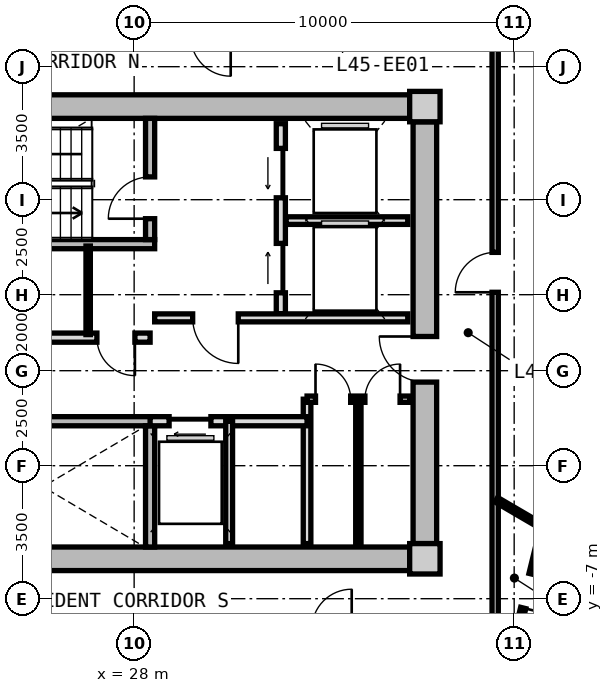
"""IFC4 building model, lengths in metres.
Left out: names, types, materials, properties, quantities, classifications, styles, units other than length and angle.
Written with IfcOpenShell. Run it as: python <this file> out.ifc"""

import sys

from ifc_helpers import new_model, si_unit, direction, frame, frame_2d, origin, origin_2d, place, context, subcontext, project, spatial, rectangle, extrude, source, transform, mapped, element, fill, save


model = new_model("IFC4")
c1 = context("Model", 3, precision=1e-05, world=origin(), true_north=direction((0.0, 1.0)))
c2 = subcontext(c1, "Body", "Model", "MODEL_VIEW")
j1 = project(units=[si_unit("LENGTHUNIT", "METRE"), si_unit("PLANEANGLEUNIT", "RADIAN")], contexts=[c1])
p1 = place(None, origin())
s1 = spatial("IfcSite", under=j1, at=p1, CompositionType="ELEMENT")
p2 = place(p1, origin())
s2 = spatial("IfcBuilding", under=s1, at=p2, CompositionType="ELEMENT")
p3 = place(p2, frame((0.0, 0.0, 146.5)))
s3 = spatial("IfcBuildingStorey", under=s2, at=p3, CompositionType="ELEMENT", Elevation=146.5)
m1 = source(origin(), c2, "Body", "SweptSolid", [
    extrude(rectangle(XDim=0.8, YDim=0.8, at=origin_2d()), origin(), (0.0, 0.0, 1.0), 3.05),
])
for number, where, z_axis, x_axis in (
    (1, (35.65, -5.95, 0.0), (0.0, 0.0, 1.0), (1.0, 0.0, 0.0)),
    (2, (35.65, 5.95, 0.0), (0.0, 0.0, 1.0), (1.0, 0.0, 0.0)),
):
    element("IfcColumn", number, at=place(p3, frame(where, z_axis=z_axis, x_axis=x_axis)), inside=s3, PredefinedType="COLUMN", context=c2, shape_type="MappedRepresentation", body=[
        mapped(m1, transform((0.0, 0.0, 0.0), x_axis=(1.0, 0.0, 0.0), y_axis=(0.0, 1.0, 0.0), z_axis=(0.0, 0.0, 1.0), scale=1.0)),
    ])
m2 = source(origin(), c2, "Body", "SweptSolid", [
    extrude(rectangle(XDim=14.5, YDim=0.62, at=frame_2d((7.25, 0.0))), origin(), (0.0, 0.0, 1.0), 2.81),
])
for number, where, z_axis, x_axis in (
    (3, (20.75, 5.95, 0.0), (0.0, 0.0, 1.0), (1.0, 0.0, 0.0)),
    (4, (35.25, -5.95, 0.0), (0.0, 0.0, 1.0), (-1.0, 0.0, 0.0)),
):
    element("IfcWall", number, at=place(p3, frame(where, z_axis=z_axis, x_axis=x_axis)), inside=s3, PredefinedType="SHEAR", context=c2, shape_type="MappedRepresentation", body=[
        mapped(m2, transform((0.0, 0.0, 0.0), x_axis=(1.0, 0.0, 0.0), y_axis=(0.0, 1.0, 0.0), z_axis=(0.0, 0.0, 1.0), scale=1.0)),
    ])
m3 = source(origin(), c2, "Body", "SweptSolid", [
    extrude(rectangle(XDim=11.1, YDim=0.62, at=frame_2d((5.55, 0.0))), origin(), (0.0, 0.0, 1.0), 2.81),
])
p4 = place(p3, frame((35.65, 5.55, 0.0), z_axis=(0.0, 0.0, 1.0), x_axis=(0.0, -1.0, 0.0)))
e5 = element("IfcWall", 5, at=p4, inside=s3, PredefinedType="SHEAR", context=c2, shape_type="MappedRepresentation", body=[
    mapped(m3, transform((0.0, 0.0, 0.0), x_axis=(1.0, 0.0, 0.0), y_axis=(0.0, 1.0, 0.0), z_axis=(0.0, 0.0, 1.0), scale=1.0)),
])
p5 = place(p4, frame((5.65, 0.0, 0.0)))
e6 = element("IfcOpeningElement", 6, at=p5, cuts=e5, PredefinedType="OPENING", context=c2, shape_type="SweptSolid", body=[
    extrude(rectangle(XDim=1.2, YDim=2.15, at=frame_2d((0.6, 1.075))), frame((0.0, 0.32, 0.0), z_axis=(0.0, -1.0, 0.0), x_axis=(1.0, 0.0, 0.0)), (0.0, 0.0, 1.0), 0.64),
])
m4 = source(origin(), c2, "Body", "SweptSolid", [
    extrude(rectangle(XDim=7.88, YDim=0.24, at=frame_2d((3.94, 0.0))), origin(), (0.0, 0.0, 1.0), 2.81),
])
p6 = place(p3, frame((20.66, 2.33, 0.0), z_axis=(0.0, 0.0, 1.0), x_axis=(1.0, 0.0, 0.0)))
e7 = element("IfcWall", 7, at=p6, inside=s3, PredefinedType="PARTITIONING", context=c2, shape_type="MappedRepresentation", body=[
    mapped(m4, transform((0.0, 0.0, 0.0), x_axis=(1.0, 0.0, 0.0), y_axis=(0.0, 1.0, 0.0), z_axis=(0.0, 0.0, 1.0), scale=1.0)),
])
m5 = source(origin(), c2, "Body", "SweptSolid", [
    extrude(rectangle(XDim=3.19, YDim=0.24, at=frame_2d((1.595, 0.0))), origin(), (0.0, 0.0, 1.0), 2.81),
])
p7 = place(p3, frame((28.42, 2.45, 0.0), z_axis=(0.0, 0.0, 1.0), x_axis=(0.0, 1.0, 0.0)))
e8 = element("IfcWall", 8, at=p7, inside=s3, PredefinedType="PARTITIONING", context=c2, shape_type="MappedRepresentation", body=[
    mapped(m5, transform((0.0, 0.0, 0.0), x_axis=(1.0, 0.0, 0.0), y_axis=(0.0, 1.0, 0.0), z_axis=(0.0, 0.0, 1.0), scale=1.0)),
])
p8 = place(p7, frame((0.55, 0.0, 0.0)))
e9 = element("IfcOpeningElement", 9, at=p8, cuts=e8, PredefinedType="OPENING", context=c2, shape_type="SweptSolid", body=[
    extrude(rectangle(XDim=1.1, YDim=2.15, at=frame_2d((0.55, 1.075))), frame((0.0, 0.13, 0.0), z_axis=(0.0, -1.0, 0.0), x_axis=(1.0, 0.0, 0.0)), (0.0, 0.0, 1.0), 0.26),
])
p9 = place(p3, frame((20.66, -2.33, 0.0), z_axis=(0.0, 0.0, 1.0), x_axis=(1.0, 0.0, 0.0)))
e10 = element("IfcWall", 10, at=p9, inside=s3, PredefinedType="PARTITIONING", context=c2, shape_type="MappedRepresentation", body=[
    mapped(m4, transform((0.0, 0.0, 0.0), x_axis=(1.0, 0.0, 0.0), y_axis=(0.0, 1.0, 0.0), z_axis=(0.0, 0.0, 1.0), scale=1.0)),
])
p10 = place(p9, frame((1.0, 0.0, 0.0)))
e11 = element("IfcOpeningElement", 11, at=p10, cuts=e10, PredefinedType="OPENING", context=c2, shape_type="SweptSolid", body=[
    extrude(rectangle(XDim=1.1, YDim=2.15, at=frame_2d((0.55, 1.075))), frame((0.0, 0.13, 0.0), z_axis=(0.0, -1.0, 0.0), x_axis=(1.0, 0.0, 0.0)), (0.0, 0.0, 1.0), 0.26),
])
p11 = place(p3, frame((28.42, -5.64, 0.0), z_axis=(0.0, 0.0, 1.0), x_axis=(0.0, 1.0, 0.0)))
e12 = element("IfcWall", 12, at=p11, inside=s3, PredefinedType="PARTITIONING", context=c2, shape_type="MappedRepresentation", body=[
    mapped(m5, transform((0.0, 0.0, 0.0), x_axis=(1.0, 0.0, 0.0), y_axis=(0.0, 1.0, 0.0), z_axis=(0.0, 0.0, 1.0), scale=1.0)),
])
m6 = source(origin(), c2, "Body", "SweptSolid", [
    extrude(rectangle(XDim=5.0, YDim=0.24, at=frame_2d((2.5, 0.0))), origin(), (0.0, 0.0, 1.0), 2.795),
])
p12 = place(p3, frame((31.86, 0.5, 0.0), z_axis=(0.0, 0.0, 1.0), x_axis=(0.0, 1.0, 0.0)))
e13 = element("IfcWall", 13, at=p12, inside=s3, PredefinedType="PARTITIONING", context=c2, shape_type="MappedRepresentation", body=[
    mapped(m6, transform((0.0, 0.0, 0.0), x_axis=(1.0, 0.0, 0.0), y_axis=(0.0, 1.0, 0.0), z_axis=(0.0, 0.0, 1.0), scale=1.0)),
])
p13 = place(p12, frame((3.05, 0.0, 0.0)))
e14 = element("IfcOpeningElement", 14, at=p13, cuts=e13, PredefinedType="OPENING", context=c2, shape_type="SweptSolid", body=[
    extrude(rectangle(XDim=1.3, YDim=2.2, at=frame_2d((0.65, 1.1))), frame((0.0, 0.13, 0.0), z_axis=(0.0, -1.0, 0.0), x_axis=(1.0, 0.0, 0.0)), (0.0, 0.0, 1.0), 0.26),
])
p14 = place(p12, frame((0.55, 0.0, 0.0)))
e15 = element("IfcOpeningElement", 15, at=p14, cuts=e13, PredefinedType="OPENING", context=c2, shape_type="SweptSolid", body=[
    extrude(rectangle(XDim=1.3, YDim=2.2, at=frame_2d((0.65, 1.1))), frame((0.0, 0.13, 0.0), z_axis=(0.0, -1.0, 0.0), x_axis=(1.0, 0.0, 0.0)), (0.0, 0.0, 1.0), 0.26),
])
m7 = source(origin(), c2, "Body", "SweptSolid", [
    extrude(rectangle(XDim=3.2, YDim=0.2, at=frame_2d((1.6, 0.0))), origin(), (0.0, 0.0, 1.0), 2.795),
])
p15 = place(p3, frame((32.0, 2.95, 0.0), z_axis=(0.0, 0.0, 1.0), x_axis=(1.0, 0.0, 0.0)))
e16 = element("IfcWall", 16, at=p15, inside=s3, PredefinedType="PARTITIONING", context=c2, shape_type="MappedRepresentation", body=[
    mapped(m7, transform((0.0, 0.0, 0.0), x_axis=(1.0, 0.0, 0.0), y_axis=(0.0, 1.0, 0.0), z_axis=(0.0, 0.0, 1.0), scale=1.0)),
])
m8 = source(origin(), c2, "Body", "SweptSolid", [
    extrude(rectangle(XDim=6.66, YDim=0.21, at=frame_2d((3.33, 0.0))), origin(), (0.0, 0.0, 1.0), 2.795),
])
p16 = place(p3, frame((28.54, 0.39, 0.0), z_axis=(0.0, 0.0, 1.0), x_axis=(1.0, 0.0, 0.0)))
e17 = element("IfcWall", 17, at=p16, inside=s3, PredefinedType="PARTITIONING", context=c2, shape_type="MappedRepresentation", body=[
    mapped(m8, transform((0.0, 0.0, 0.0), x_axis=(1.0, 0.0, 0.0), y_axis=(0.0, 1.0, 0.0), z_axis=(0.0, 0.0, 1.0), scale=1.0)),
])
p17 = place(p16, frame((1.0, 0.0, 0.0)))
e18 = element("IfcOpeningElement", 18, at=p17, cuts=e17, PredefinedType="OPENING", context=c2, shape_type="SweptSolid", body=[
    extrude(rectangle(XDim=1.2, YDim=2.15, at=frame_2d((0.6, 1.075))), frame((0.0, 0.115, 0.0), z_axis=(0.0, -1.0, 0.0), x_axis=(1.0, 0.0, 0.0)), (0.0, 0.0, 1.0), 0.23),
])
m9 = source(origin(), c2, "Body", "SweptSolid", [
    extrude(rectangle(XDim=7.62, YDim=0.24, at=frame_2d((3.81, 0.0))), origin(), (0.0, 0.0, 1.0), 2.795),
])
p18 = place(p3, frame((20.8, -0.13, 0.0), z_axis=(0.0, 0.0, 1.0), x_axis=(1.0, 0.0, 0.0)))
e19 = element("IfcWall", 19, at=p18, inside=s3, PredefinedType="PARTITIONING", context=c2, shape_type="MappedRepresentation", body=[
    mapped(m9, transform((0.0, 0.0, 0.0), x_axis=(1.0, 0.0, 0.0), y_axis=(0.0, 1.0, 0.0), z_axis=(0.0, 0.0, 1.0), scale=1.0)),
])
p19 = place(p18, frame((6.22, 0.0, 0.0)))
e20 = element("IfcOpeningElement", 20, at=p19, cuts=e19, PredefinedType="OPENING", context=c2, shape_type="SweptSolid", body=[
    extrude(rectangle(XDim=1.0, YDim=2.1, at=frame_2d((0.5, 1.05))), frame((0.0, 0.13, 0.0), z_axis=(0.0, -1.0, 0.0), x_axis=(1.0, 0.0, 0.0)), (0.0, 0.0, 1.0), 0.26),
])
p20 = place(p18, frame((2.4, 0.0, 0.0)))
e21 = element("IfcOpeningElement", 21, at=p20, cuts=e19, PredefinedType="OPENING", context=c2, shape_type="SweptSolid", body=[
    extrude(rectangle(XDim=1.0, YDim=2.1, at=frame_2d((0.5, 1.05))), frame((0.0, 0.13, 0.0), z_axis=(0.0, -1.0, 0.0), x_axis=(1.0, 0.0, 0.0)), (0.0, 0.0, 1.0), 0.26),
])
m10 = source(origin(), c2, "Body", "SweptSolid", [
    extrude(rectangle(XDim=2.33, YDim=0.115, at=frame_2d((1.165, 0.0))), origin(), (0.0, 0.0, 1.0), 2.795),
])
p21 = place(p3, frame((26.79, -0.05, 0.0), z_axis=(0.0, 0.0, 1.0), x_axis=(0.0, 1.0, 0.0)))
e22 = element("IfcWall", 22, at=p21, inside=s3, PredefinedType="PARTITIONING", context=c2, shape_type="MappedRepresentation", body=[
    mapped(m10, transform((0.0, 0.0, 0.0), x_axis=(1.0, 0.0, 0.0), y_axis=(0.0, 1.0, 0.0), z_axis=(0.0, 0.0, 1.0), scale=1.0)),
])
m11 = source(origin(), c2, "Body", "SweptSolid", [
    extrude(rectangle(XDim=3.8, YDim=0.2, at=frame_2d((1.9, 0.0))), origin(), (0.0, 0.0, 1.0), 2.795),
])
p22 = place(p3, frame((32.55, -5.55, 0.0), z_axis=(0.0, 0.0, 1.0), x_axis=(0.0, 1.0, 0.0)))
e23 = element("IfcWall", 23, at=p22, inside=s3, PredefinedType="PARTITIONING", context=c2, shape_type="MappedRepresentation", body=[
    mapped(m11, transform((0.0, 0.0, 0.0), x_axis=(1.0, 0.0, 0.0), y_axis=(0.0, 1.0, 0.0), z_axis=(0.0, 0.0, 1.0), scale=1.0)),
])
m12 = source(origin(), c2, "Body", "SweptSolid", [
    extrude(rectangle(XDim=4.13, YDim=0.24, at=frame_2d((2.065, 0.0))), origin(), (0.0, 0.0, 1.0), 2.795),
])
p23 = place(p3, frame((28.42, -2.33, 0.0), z_axis=(0.0, 0.0, 1.0), x_axis=(1.0, 0.0, 0.0)))
e24 = element("IfcWall", 24, at=p23, inside=s3, PredefinedType="PARTITIONING", context=c2, shape_type="MappedRepresentation", body=[
    mapped(m12, transform((0.0, 0.0, 0.0), x_axis=(1.0, 0.0, 0.0), y_axis=(0.0, 1.0, 0.0), z_axis=(0.0, 0.0, 1.0), scale=1.0)),
])
p24 = place(p23, frame((0.5, 0.0, 0.0)))
e25 = element("IfcOpeningElement", 25, at=p24, cuts=e24, PredefinedType="OPENING", context=c2, shape_type="SweptSolid", body=[
    extrude(rectangle(XDim=1.1, YDim=2.2, at=frame_2d((0.55, 1.1))), frame((0.0, 0.13, 0.0), z_axis=(0.0, -1.0, 0.0), x_axis=(1.0, 0.0, 0.0)), (0.0, 0.0, 1.0), 0.26),
])
m13 = source(origin(), c2, "Body", "SweptSolid", [
    extrude(rectangle(XDim=3.22, YDim=0.18, at=frame_2d((1.61, 0.0))), origin(), (0.0, 0.0, 1.0), 2.795),
])
p25 = place(p3, frame((30.5, -5.55, 0.0), z_axis=(0.0, 0.0, 1.0), x_axis=(0.0, 1.0, 0.0)))
e26 = element("IfcWall", 26, at=p25, inside=s3, PredefinedType="PARTITIONING", context=c2, shape_type="MappedRepresentation", body=[
    mapped(m13, transform((0.0, 0.0, 0.0), x_axis=(1.0, 0.0, 0.0), y_axis=(0.0, 1.0, 0.0), z_axis=(0.0, 0.0, 1.0), scale=1.0)),
])
m14 = source(origin(), c2, "Body", "SweptSolid", [
    extrude(rectangle(XDim=2.7, YDim=0.165, at=frame_2d((1.35, 0.0))), origin(), (0.0, 0.0, 1.0), 2.795),
])
p26 = place(p3, frame((32.55, -1.75, 0.0), z_axis=(0.0, 0.0, 1.0), x_axis=(1.0, 0.0, 0.0)))
e27 = element("IfcWall", 27, at=p26, inside=s3, PredefinedType="PARTITIONING", context=c2, shape_type="MappedRepresentation", body=[
    mapped(m14, transform((0.0, 0.0, 0.0), x_axis=(1.0, 0.0, 0.0), y_axis=(0.0, 1.0, 0.0), z_axis=(0.0, 0.0, 1.0), scale=1.0)),
])
p27 = place(p26, frame((0.222, 0.0, 0.0)))
e28 = element("IfcOpeningElement", 28, at=p27, cuts=e27, PredefinedType="OPENING", context=c2, shape_type="SweptSolid", body=[
    extrude(rectangle(XDim=0.925, YDim=2.1, at=frame_2d((0.462, 1.05))), frame((0.0, 0.093, 0.0), z_axis=(0.0, -1.0, 0.0), x_axis=(1.0, 0.0, 0.0)), (0.0, 0.0, 1.0), 0.185),
])
p28 = place(p26, frame((1.522, 0.0, 0.0)))
e29 = element("IfcOpeningElement", 29, at=p28, cuts=e27, PredefinedType="OPENING", context=c2, shape_type="SweptSolid", body=[
    extrude(rectangle(XDim=0.925, YDim=2.1, at=frame_2d((0.462, 1.05))), frame((0.0, 0.093, 0.0), z_axis=(0.0, -1.0, 0.0), x_axis=(1.0, 0.0, 0.0)), (0.0, 0.0, 1.0), 0.185),
])
m15 = source(origin(), c2, "Body", "SweptSolid", [
    extrude(rectangle(XDim=3.8, YDim=0.14, at=frame_2d((1.9, 0.0))), origin(), (0.0, 0.0, 1.0), 2.795),
])
p29 = place(p3, frame((33.9, -5.55, 0.0), z_axis=(0.0, 0.0, 1.0), x_axis=(0.0, 1.0, 0.0)))
e30 = element("IfcWall", 30, at=p29, inside=s3, PredefinedType="PARTITIONING", context=c2, shape_type="MappedRepresentation", body=[
    mapped(m15, transform((0.0, 0.0, 0.0), x_axis=(1.0, 0.0, 0.0), y_axis=(0.0, 1.0, 0.0), z_axis=(0.0, 0.0, 1.0), scale=1.0)),
])
m16 = source(origin(), c2, "Body", "SweptSolid", [
    extrude(rectangle(XDim=15.6, YDim=0.165, at=frame_2d((7.8, 0.0))), origin(), (0.0, 0.0, 1.0), 2.795),
])
p30 = place(p3, frame((37.5, 7.8, 0.0), z_axis=(0.0, 0.0, 1.0), x_axis=(0.0, -1.0, 0.0)))
e31 = element("IfcWall", 31, at=p30, inside=s3, PredefinedType="PARTITIONING", context=c2, shape_type="MappedRepresentation", body=[
    mapped(m16, transform((0.0, 0.0, 0.0), x_axis=(1.0, 0.0, 0.0), y_axis=(0.0, 1.0, 0.0), z_axis=(0.0, 0.0, 1.0), scale=1.0)),
])
p31 = place(p30, frame((5.687, 0.0, 0.0)))
e32 = element("IfcOpeningElement", 32, at=p31, cuts=e31, PredefinedType="OPENING", context=c2, shape_type="SweptSolid", body=[
    extrude(rectangle(XDim=1.05, YDim=2.15, at=frame_2d((0.525, 1.075))), frame((0.0, 0.093, 0.0), z_axis=(0.0, -1.0, 0.0), x_axis=(1.0, 0.0, 0.0)), (0.0, 0.0, 1.0), 0.185),
])
m17 = source(origin(), c2, "Body", "SweptSolid", [
    extrude(rectangle(XDim=6.966, YDim=0.115, at=frame_2d((3.483, 0.0))), origin(), (0.0, 0.0, 1.0), 2.795),
])
p32 = place(p3, frame((40.85, 5.254, 0.0), z_axis=(0.0, 0.0, 1.0), x_axis=(-0.616695640563, 0.787201681217, 0.0)))
e33 = element("IfcWall", 33, at=p32, inside=s3, PredefinedType="PARTITIONING", context=c2, shape_type="MappedRepresentation", body=[
    mapped(m17, transform((0.0, 0.0, 0.0), x_axis=(1.0, 0.0, 0.0), y_axis=(0.0, 1.0, 0.0), z_axis=(0.0, 0.0, 1.0), scale=1.0)),
])
p33 = place(p32, frame((3.008, 0.0, 0.0)))
e34 = element("IfcOpeningElement", 34, at=p33, cuts=e33, PredefinedType="OPENING", context=c2, shape_type="SweptSolid", body=[
    extrude(rectangle(XDim=0.95, YDim=2.1, at=frame_2d((0.475, 1.05))), frame((0.0, 0.067, 0.0), z_axis=(0.0, -1.0, 0.0), x_axis=(1.0, 0.0, 0.0)), (0.0, 0.0, 1.0), 0.135),
])
m18 = source(origin(), c2, "Body", "SweptSolid", [
    extrude(rectangle(XDim=1.425, YDim=0.14, at=frame_2d((0.712, 0.0))), origin(), (0.0, 0.0, 1.0), 2.795),
])
p34 = place(p3, frame((37.53, -4.396, 0.0), z_axis=(0.0, 0.0, 1.0), x_axis=(0.86324395577, -0.50478695786, 0.0)))
e35 = element("IfcWall", 35, at=p34, inside=s3, PredefinedType="PARTITIONING", context=c2, shape_type="MappedRepresentation", body=[
    mapped(m18, transform((0.0, 0.0, 0.0), x_axis=(1.0, 0.0, 0.0), y_axis=(0.0, 1.0, 0.0), z_axis=(0.0, 0.0, 1.0), scale=1.0)),
])
m19 = source(origin(), c2, "Body", "SweptSolid", [
    extrude(rectangle(XDim=3.464, YDim=0.14, at=frame_2d((1.732, 0.0))), origin(), (0.0, 0.0, 1.0), 2.795),
])
p35 = place(p3, frame((38.76, -5.115, 0.0), z_axis=(0.0, 0.0, 1.0), x_axis=(-0.238055968485, -0.971251438027, 0.0)))
e36 = element("IfcWall", 36, at=p35, inside=s3, PredefinedType="PARTITIONING", context=c2, shape_type="MappedRepresentation", body=[
    mapped(m19, transform((0.0, 0.0, 0.0), x_axis=(1.0, 0.0, 0.0), y_axis=(0.0, 1.0, 0.0), z_axis=(0.0, 0.0, 1.0), scale=1.0)),
])
p36 = place(p35, frame((1.272, 0.0, 0.0)))
e37 = element("IfcOpeningElement", 37, at=p36, cuts=e36, PredefinedType="OPENING", context=c2, shape_type="SweptSolid", body=[
    extrude(rectangle(XDim=0.92, YDim=2.1, at=frame_2d((0.46, 1.05))), frame((0.0, 0.08, 0.0), z_axis=(0.0, -1.0, 0.0), x_axis=(1.0, 0.0, 0.0)), (0.0, 0.0, 1.0), 0.16),
])
m20 = source(origin(), c2, "Body", "SweptSolid", [
    extrude(rectangle(XDim=1.1, YDim=2.15, at=frame_2d((0.55, 1.075))), frame((0.0, 0.025, 0.0), z_axis=(0.0, -1.0, 0.0), x_axis=(1.0, 0.0, 0.0)), (0.0, 0.0, 1.0), 0.05),
])
p37 = place(p8, origin())
e38 = element("IfcDoor", 38, at=p37, inside=s3, OperationType="SINGLE_SWING_LEFT", PredefinedType="DOOR", context=c2, shape_type="MappedRepresentation", body=[
    mapped(m20, transform((0.0, 0.0, 0.0), x_axis=(1.0, 0.0, 0.0), y_axis=(0.0, 1.0, 0.0), z_axis=(0.0, 0.0, 1.0), scale=1.0)),
])
fill(e9, e38)
m21 = source(origin(), c2, "Body", "SweptSolid", [
    extrude(rectangle(XDim=1.3, YDim=2.2, at=frame_2d((0.65, 1.1))), frame((0.0, 0.025, 0.0), z_axis=(0.0, -1.0, 0.0), x_axis=(1.0, 0.0, 0.0)), (0.0, 0.0, 1.0), 0.05),
])
p38 = place(p13, origin())
e39 = element("IfcDoor", 39, at=p38, inside=s3, OperationType="SLIDING_TO_LEFT", PredefinedType="DOOR", context=c2, shape_type="MappedRepresentation", body=[
    mapped(m21, transform((0.0, 0.0, 0.0), x_axis=(1.0, 0.0, 0.0), y_axis=(0.0, 1.0, 0.0), z_axis=(0.0, 0.0, 1.0), scale=1.0)),
])
fill(e14, e39)
p39 = place(p14, origin())
e40 = element("IfcDoor", 40, at=p39, inside=s3, OperationType="SLIDING_TO_RIGHT", PredefinedType="DOOR", context=c2, shape_type="MappedRepresentation", body=[
    mapped(m21, transform((0.0, 0.0, 0.0), x_axis=(1.0, 0.0, 0.0), y_axis=(0.0, 1.0, 0.0), z_axis=(0.0, 0.0, 1.0), scale=1.0)),
])
fill(e15, e40)
m22 = source(origin(), c2, "Body", "SweptSolid", [
    extrude(rectangle(XDim=1.2, YDim=2.15, at=frame_2d((0.6, 1.075))), frame((0.0, 0.025, 0.0), z_axis=(0.0, -1.0, 0.0), x_axis=(1.0, 0.0, 0.0)), (0.0, 0.0, 1.0), 0.05),
])
p40 = place(p17, frame((1.2, 0.0, 0.0), z_axis=(0.0, 0.0, 1.0), x_axis=(-1.0, 0.0, 0.0)))
e41 = element("IfcDoor", 41, at=p40, inside=s3, OperationType="SINGLE_SWING_LEFT", PredefinedType="DOOR", context=c2, shape_type="MappedRepresentation", body=[
    mapped(m22, transform((0.0, 0.0, 0.0), x_axis=(1.0, 0.0, 0.0), y_axis=(0.0, 1.0, 0.0), z_axis=(0.0, 0.0, 1.0), scale=1.0)),
])
fill(e18, e41)
p41 = place(p5, frame((1.2, 0.0, 0.0), z_axis=(0.0, 0.0, 1.0), x_axis=(-1.0, 0.0, 0.0)))
e42 = element("IfcDoor", 42, at=p41, inside=s3, OperationType="SINGLE_SWING_RIGHT", PredefinedType="DOOR", context=c2, shape_type="MappedRepresentation", body=[
    mapped(m22, transform((0.0, 0.0, 0.0), x_axis=(1.0, 0.0, 0.0), y_axis=(0.0, 1.0, 0.0), z_axis=(0.0, 0.0, 1.0), scale=1.0)),
])
fill(e6, e42)
m23 = source(origin(), c2, "Body", "SweptSolid", [
    extrude(rectangle(XDim=1.0, YDim=2.1, at=frame_2d((0.5, 1.05))), frame((0.0, 0.025, 0.0), z_axis=(0.0, -1.0, 0.0), x_axis=(1.0, 0.0, 0.0)), (0.0, 0.0, 1.0), 0.05),
])
p42 = place(p19, frame((1.0, 0.0, 0.0), z_axis=(0.0, 0.0, 1.0), x_axis=(-1.0, 0.0, 0.0)))
e43 = element("IfcDoor", 43, at=p42, inside=s3, OperationType="SINGLE_SWING_LEFT", PredefinedType="DOOR", context=c2, shape_type="MappedRepresentation", body=[
    mapped(m23, transform((0.0, 0.0, 0.0), x_axis=(1.0, 0.0, 0.0), y_axis=(0.0, 1.0, 0.0), z_axis=(0.0, 0.0, 1.0), scale=1.0)),
])
fill(e20, e43)
m24 = source(origin(), c2, "Body", "SweptSolid", [
    extrude(rectangle(XDim=1.1, YDim=2.2, at=frame_2d((0.55, 1.1))), frame((0.0, 0.025, 0.0), z_axis=(0.0, -1.0, 0.0), x_axis=(1.0, 0.0, 0.0)), (0.0, 0.0, 1.0), 0.05),
])
p43 = place(p24, frame((1.1, 0.0, 0.0), z_axis=(0.0, 0.0, 1.0), x_axis=(-1.0, 0.0, 0.0)))
e44 = element("IfcDoor", 44, at=p43, inside=s3, OperationType="SLIDING_TO_LEFT", PredefinedType="DOOR", context=c2, shape_type="MappedRepresentation", body=[
    mapped(m24, transform((0.0, 0.0, 0.0), x_axis=(1.0, 0.0, 0.0), y_axis=(0.0, 1.0, 0.0), z_axis=(0.0, 0.0, 1.0), scale=1.0)),
])
fill(e25, e44)
m25 = source(origin(), c2, "Body", "SweptSolid", [
    extrude(rectangle(XDim=0.925, YDim=2.1, at=frame_2d((0.462, 1.05))), frame((0.0, 0.025, 0.0), z_axis=(0.0, -1.0, 0.0), x_axis=(1.0, 0.0, 0.0)), (0.0, 0.0, 1.0), 0.05),
])
p44 = place(p27, origin())
e45 = element("IfcDoor", 45, at=p44, inside=s3, OperationType="SINGLE_SWING_LEFT", PredefinedType="DOOR", context=c2, shape_type="MappedRepresentation", body=[
    mapped(m25, transform((0.0, 0.0, 0.0), x_axis=(1.0, 0.0, 0.0), y_axis=(0.0, 1.0, 0.0), z_axis=(0.0, 0.0, 1.0), scale=1.0)),
])
fill(e28, e45)
p45 = place(p28, origin())
e46 = element("IfcDoor", 46, at=p45, inside=s3, OperationType="SINGLE_SWING_RIGHT", PredefinedType="DOOR", context=c2, shape_type="MappedRepresentation", body=[
    mapped(m25, transform((0.0, 0.0, 0.0), x_axis=(1.0, 0.0, 0.0), y_axis=(0.0, 1.0, 0.0), z_axis=(0.0, 0.0, 1.0), scale=1.0)),
])
fill(e29, e46)
m26 = source(origin(), c2, "Body", "SweptSolid", [
    extrude(rectangle(XDim=1.05, YDim=2.15, at=frame_2d((0.525, 1.075))), frame((0.0, 0.025, 0.0), z_axis=(0.0, -1.0, 0.0), x_axis=(1.0, 0.0, 0.0)), (0.0, 0.0, 1.0), 0.05),
])
p46 = place(p31, frame((1.05, 0.0, 0.0), z_axis=(0.0, 0.0, 1.0), x_axis=(-1.0, 0.0, 0.0)))
e47 = element("IfcDoor", 47, at=p46, inside=s3, OperationType="SINGLE_SWING_LEFT", PredefinedType="DOOR", context=c2, shape_type="MappedRepresentation", body=[
    mapped(m26, transform((0.0, 0.0, 0.0), x_axis=(1.0, 0.0, 0.0), y_axis=(0.0, 1.0, 0.0), z_axis=(0.0, 0.0, 1.0), scale=1.0)),
])
fill(e32, e47)
m27 = source(origin(), c2, "Body", "SweptSolid", [
    extrude(rectangle(XDim=0.92, YDim=2.1, at=frame_2d((0.46, 1.05))), frame((0.0, 0.025, 0.0), z_axis=(0.0, -1.0, 0.0), x_axis=(1.0, 0.0, 0.0)), (0.0, 0.0, 1.0), 0.05),
])
p47 = place(p36, origin())
e48 = element("IfcDoor", 48, at=p47, inside=s3, OperationType="SINGLE_SWING_RIGHT", PredefinedType="DOOR", context=c2, shape_type="MappedRepresentation", body=[
    mapped(m27, transform((0.0, 0.0, 0.0), x_axis=(1.0, 0.0, 0.0), y_axis=(0.0, 1.0, 0.0), z_axis=(0.0, 0.0, 1.0), scale=1.0)),
])
fill(e37, e48)
save(model, sys.argv[1])
